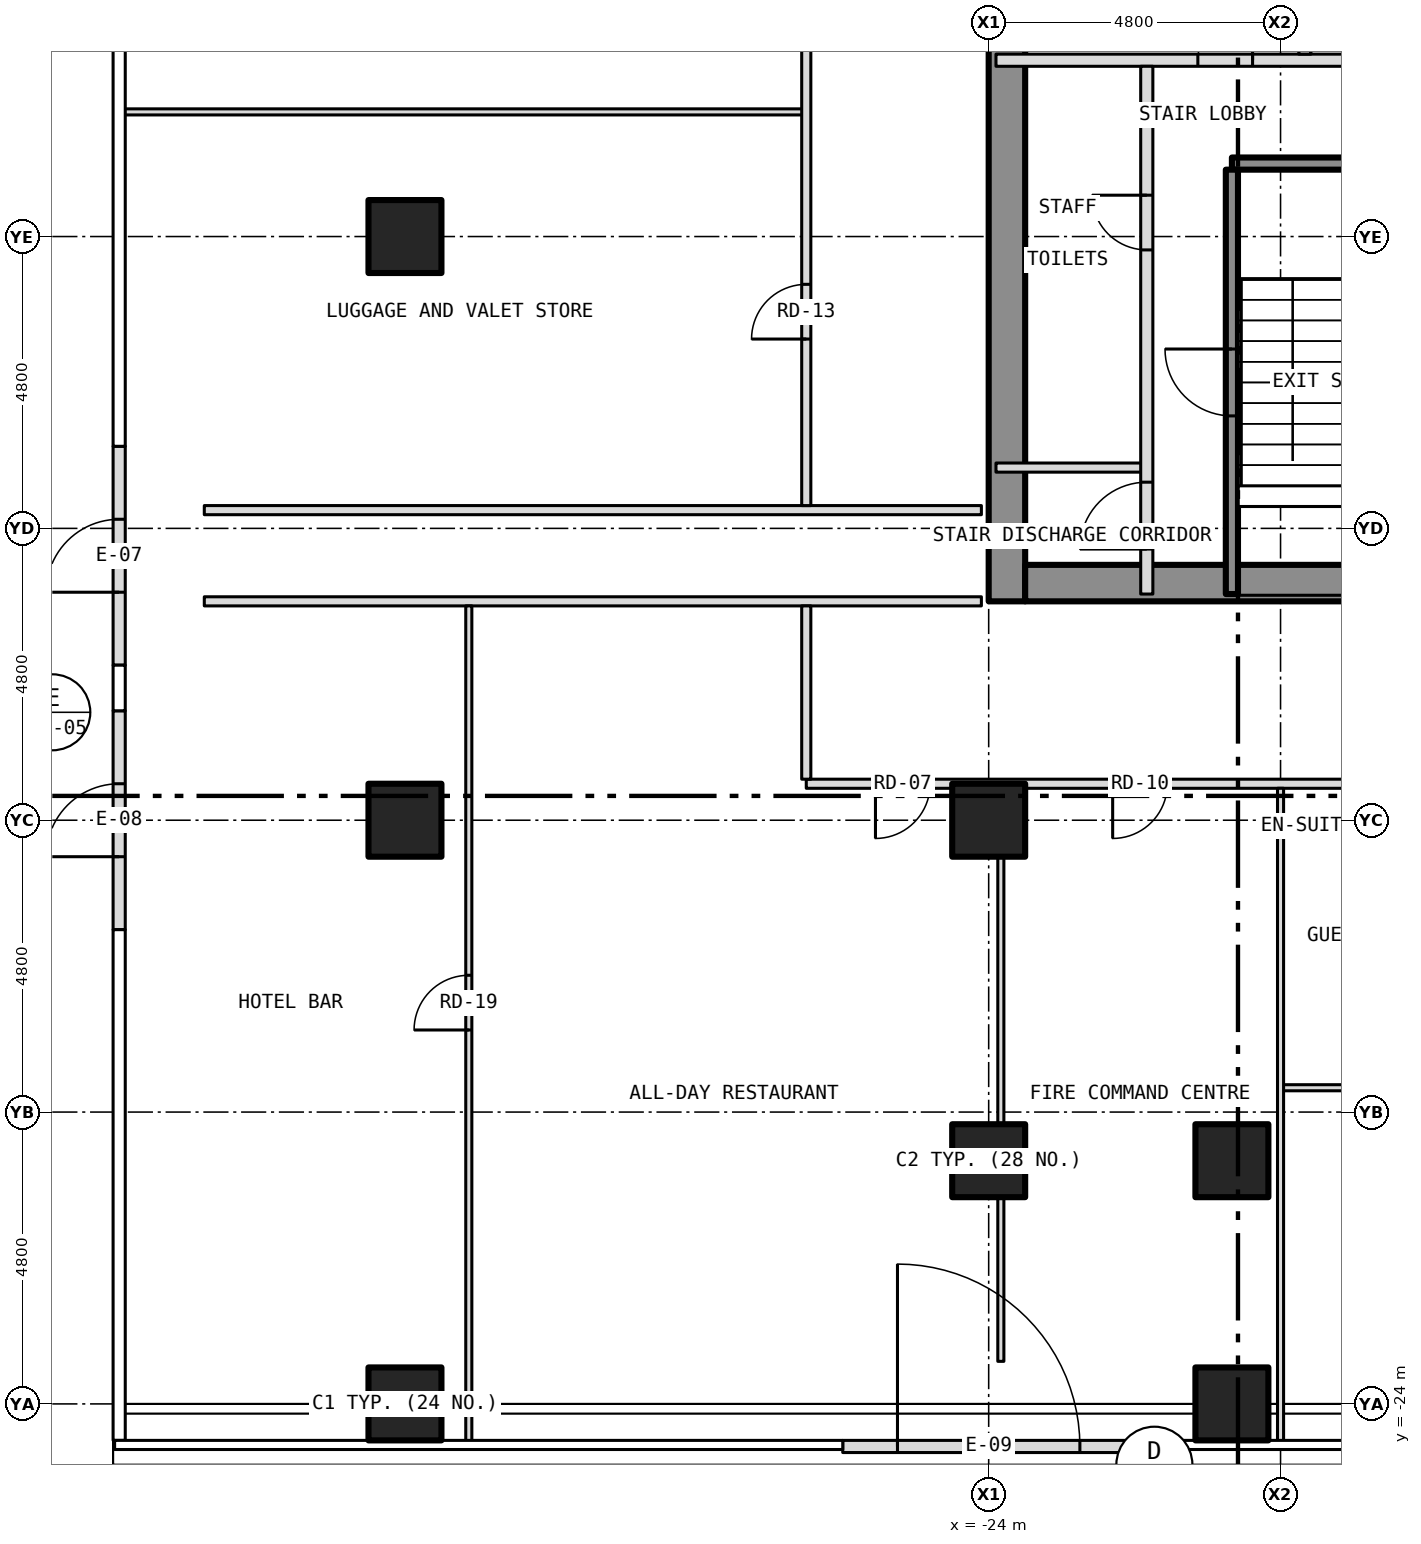
"""IFC4 building model, lengths in metres.
Left out: names, types, materials, properties, quantities, classifications, styles, units other than length and angle.
Written with IfcOpenShell. Run it as: python <this file> out.ifc"""

import sys

from ifc_helpers import new_model, si_unit, direction, frame, frame_2d, origin, origin_2d, place, context, subcontext, project, spatial, rectangle, hollow_rectangle, extrude, element, fill, save


model = new_model("IFC4")
c1 = context("Model", 3, precision=1e-05, world=origin(), true_north=direction((0.0, 1.0)))
c2 = subcontext(c1, "Body", "Model", "MODEL_VIEW")
j1 = project(units=[si_unit("LENGTHUNIT", "METRE"), si_unit("PLANEANGLEUNIT", "RADIAN")], contexts=[c1])
p1 = place(None, origin())
s1 = spatial("IfcSite", under=j1, at=p1, CompositionType="ELEMENT")
p2 = place(p1, origin())
s2 = spatial("IfcBuilding", under=s1, at=p2, CompositionType="ELEMENT")
p3 = place(p2, origin())
s3 = spatial("IfcBuildingStorey", under=s2, at=p3, CompositionType="ELEMENT", Elevation=0.0)
for number, where, z_axis, x_axis in (
    (1, (-33.6, -24.0, -0.3), (0.0, 0.0, 1.0), (1.0, 0.0, 0.0)),
    (2, (-33.6, -14.4, -0.3), (0.0, 0.0, 1.0), (1.0, 0.0, 0.0)),
    (3, (-33.6, -4.8, -0.3), (0.0, 0.0, 1.0), (1.0, 0.0, 0.0)),
    (4, (-20.0, -24.0, -0.3), (0.0, 0.0, 1.0), (1.0, 0.0, 0.0)),
    (5, (-24.0, -20.0, -0.3), (0.0, 0.0, 1.0), (1.0, 0.0, 0.0)),
    (6, (-24.0, -14.4, -0.3), (0.0, 0.0, 1.0), (1.0, 0.0, 0.0)),
    (7, (-20.0, -20.0, -0.3), (0.0, 0.0, 1.0), (1.0, 0.0, 0.0)),
):
    element("IfcColumn", number, at=place(p3, frame(where, z_axis=z_axis, x_axis=x_axis)), inside=s3, PredefinedType="COLUMN", context=c2, shape_type="SweptSolid", body=[
        extrude(hollow_rectangle(XDim=1.2, YDim=1.2, WallThickness=0.07, at=origin_2d()), origin(), (0.0, 0.0, 1.0), 7.55),
    ])
p4 = place(p3, frame((-23.7, -10.8, 0.0), z_axis=(0.0, 0.0, 1.0), x_axis=(0.0, 1.0, 0.0)))
e8 = element("IfcWall", 8, at=p4, inside=s3, PredefinedType="SHEAR", context=c2, shape_type="SweptSolid", body=[
    extrude(rectangle(XDim=21.6, YDim=0.6, at=frame_2d((10.8, 0.0))), origin(), (0.0, 0.0, 1.0), 7.2),
])
p5 = place(p3, frame((-23.4, -10.5, 0.0), z_axis=(0.0, 0.0, 1.0), x_axis=(1.0, 0.0, 0.0)))
e9 = element("IfcWall", 9, at=p5, inside=s3, PredefinedType="SHEAR", context=c2, shape_type="SweptSolid", body=[
    extrude(rectangle(XDim=7.0, YDim=0.6, at=frame_2d((3.5, 0.0))), origin(), (0.0, 0.0, 1.0), 7.2),
])
p6 = place(p3, frame((-38.3, -11.85, 0.0), z_axis=(0.0, 0.0, 1.0), x_axis=(0.0, 1.0, 0.0)))
e10 = element("IfcWall", 10, at=p6, inside=s3, PredefinedType="SOLIDWALL", context=c2, shape_type="SweptSolid", body=[
    extrude(rectangle(XDim=3.6, YDim=0.2, at=frame_2d((1.8, 0.0))), origin(), (0.0, 0.0, 1.0), 6.628),
])
p7 = place(p6, frame((1.2, 0.0, 0.0)))
e11 = element("IfcOpeningElement", 11, at=p7, cuts=e10, PredefinedType="OPENING", context=c2, shape_type="SweptSolid", body=[
    extrude(rectangle(XDim=1.2, YDim=2.4, at=frame_2d((0.6, 1.2))), frame((0.0, 0.112, 0.0), z_axis=(0.0, -1.0, 0.0), x_axis=(1.0, 0.0, 0.0)), (0.0, 0.0, 1.0), 0.224),
])
p8 = place(p3, frame((-38.3, -16.2, 0.0), z_axis=(0.0, 0.0, 1.0), x_axis=(0.0, 1.0, 0.0)))
e12 = element("IfcWall", 12, at=p8, inside=s3, PredefinedType="SOLIDWALL", context=c2, shape_type="SweptSolid", body=[
    extrude(rectangle(XDim=3.6, YDim=0.2, at=frame_2d((1.8, 0.0))), origin(), (0.0, 0.0, 1.0), 6.323),
])
p9 = place(p8, frame((1.2, 0.0, 0.0)))
e13 = element("IfcOpeningElement", 13, at=p9, cuts=e12, PredefinedType="OPENING", context=c2, shape_type="SweptSolid", body=[
    extrude(rectangle(XDim=1.2, YDim=2.4, at=frame_2d((0.6, 1.2))), frame((0.0, 0.112, 0.0), z_axis=(0.0, -1.0, 0.0), x_axis=(1.0, 0.0, 0.0)), (0.0, 0.0, 1.0), 0.224),
])
p10 = place(p3, frame((-26.4, -24.7, -0.2), z_axis=(0.0, 0.0, 1.0), x_axis=(1.0, 0.0, 0.0)))
e14 = element("IfcWall", 14, at=p10, inside=s3, PredefinedType="SOLIDWALL", context=c2, shape_type="SweptSolid", body=[
    extrude(rectangle(XDim=4.8, YDim=0.2, at=frame_2d((2.4, 0.0))), origin(), (0.0, 0.0, 1.0), 7.7),
])
p11 = place(p10, frame((0.9, 0.0, 0.2)))
e15 = element("IfcOpeningElement", 15, at=p11, cuts=e14, PredefinedType="OPENING", context=c2, shape_type="SweptSolid", body=[
    extrude(rectangle(XDim=3.0, YDim=2.6, at=frame_2d((1.5, 1.3))), frame((0.0, 0.112, 0.0), z_axis=(0.0, -1.0, 0.0), x_axis=(1.0, 0.0, 0.0)), (0.0, 0.0, 1.0), 0.224),
])
p12 = place(p3, frame((-19.2, -18.8, 0.0), z_axis=(0.0, 0.0, 1.0), x_axis=(1.0, 0.0, 0.0)))
e16 = element("IfcWall", 16, at=p12, inside=s3, PredefinedType="PARTITIONING", context=c2, shape_type="SweptSolid", body=[
    extrude(rectangle(XDim=5.6, YDim=0.1, at=frame_2d((2.8, 0.0))), origin(), (0.0, 0.0, 1.0), 7.25),
])
p13 = place(p3, frame((-27.0, -13.8, 0.0), z_axis=(0.0, 0.0, 1.0), x_axis=(1.0, 0.0, 0.0)))
e17 = element("IfcWall", 17, at=p13, inside=s3, PredefinedType="PARTITIONING", context=c2, shape_type="SweptSolid", body=[
    extrude(rectangle(XDim=22.2, YDim=0.15, at=frame_2d((11.1, 0.0))), origin(), (0.0, 0.0, 1.0), 7.25),
])
p14 = place(p13, frame((9.03, 0.0, 0.0)))
e18 = element("IfcOpeningElement", 18, at=p14, cuts=e17, PredefinedType="OPENING", context=c2, shape_type="SweptSolid", body=[
    extrude(rectangle(XDim=0.9, YDim=2.1, at=frame_2d((0.45, 1.05))), frame((0.0, 0.087, 0.0), z_axis=(0.0, -1.0, 0.0), x_axis=(1.0, 0.0, 0.0)), (0.0, 0.0, 1.0), 0.174),
])
p15 = place(p13, frame((11.08, 0.0, 0.0)))
e19 = element("IfcOpeningElement", 19, at=p15, cuts=e17, PredefinedType="OPENING", context=c2, shape_type="SweptSolid", body=[
    extrude(rectangle(XDim=0.9, YDim=2.1, at=frame_2d((0.45, 1.05))), frame((0.0, 0.087, 0.0), z_axis=(0.0, -1.0, 0.0), x_axis=(1.0, 0.0, 0.0)), (0.0, 0.0, 1.0), 0.174),
])
p16 = place(p13, frame((1.138, 0.0, 0.0)))
e20 = element("IfcOpeningElement", 20, at=p16, cuts=e17, PredefinedType="OPENING", context=c2, shape_type="SweptSolid", body=[
    extrude(rectangle(XDim=0.9, YDim=2.1, at=frame_2d((0.45, 1.05))), frame((0.0, 0.087, 0.0), z_axis=(0.0, -1.0, 0.0), x_axis=(1.0, 0.0, 0.0)), (0.0, 0.0, 1.0), 0.174),
])
p17 = place(p13, frame((5.039, 0.0, 0.0)))
e21 = element("IfcOpeningElement", 21, at=p17, cuts=e17, PredefinedType="OPENING", context=c2, shape_type="SweptSolid", body=[
    extrude(rectangle(XDim=0.9, YDim=2.1, at=frame_2d((0.45, 1.05))), frame((0.0, 0.087, 0.0), z_axis=(0.0, -1.0, 0.0), x_axis=(1.0, 0.0, 0.0)), (0.0, 0.0, 1.0), 0.174),
])
for number, where, z_axis, x_axis in (
    (22, (-36.9, -10.8, 0.0), (0.0, 0.0, 1.0), (1.0, 0.0, 0.0)),
    (23, (-36.9, -9.3, 0.0), (0.0, 0.0, 1.0), (1.0, 0.0, 0.0)),
):
    element("IfcWall", number, at=place(p3, frame(where, z_axis=z_axis, x_axis=x_axis)), inside=s3, PredefinedType="PARTITIONING", context=c2, shape_type="SweptSolid", body=[
        extrude(rectangle(XDim=12.78, YDim=0.15, at=frame_2d((6.39, 0.0))), origin(), (0.0, 0.0, 1.0), 7.25),
    ])
p18 = place(p3, frame((-23.88, -8.6, 0.0), z_axis=(0.0, 0.0, 1.0), x_axis=(1.0, 0.0, 0.0)))
e24 = element("IfcWall", 24, at=p18, inside=s3, PredefinedType="PARTITIONING", context=c2, shape_type="SweptSolid", body=[
    extrude(rectangle(XDim=2.48, YDim=0.15, at=frame_2d((1.24, 0.0))), origin(), (0.0, 0.0, 1.0), 7.2),
])
p19 = place(p3, frame((-20.0, -3.6, 0.0), z_axis=(0.0, 0.0, 1.0), x_axis=(1.0, 0.0, 0.0)))
e25 = element("IfcWall", 25, at=p19, inside=s3, PredefinedType="SHEAR", context=c2, shape_type="SweptSolid", body=[
    extrude(rectangle(XDim=4.08, YDim=0.2, at=frame_2d((2.04, 0.0))), origin(), (0.0, 0.0, 1.0), 7.2),
])
p20 = place(p3, frame((-38.28, -2.75, 0.0), z_axis=(0.0, 0.0, 1.0), x_axis=(1.0, 0.0, 0.0)))
e26 = element("IfcWall", 26, at=p20, inside=s3, PredefinedType="PARTITIONING", context=c2, shape_type="SweptSolid", body=[
    extrude(rectangle(XDim=11.28, YDim=0.1, at=frame_2d((5.64, 0.0))), origin(), (0.0, 0.0, 1.0), 7.25),
])
p21 = place(p3, frame((-23.88, -1.9, 0.0), z_axis=(0.0, 0.0, 1.0), x_axis=(1.0, 0.0, 0.0)))
e27 = element("IfcWall", 27, at=p21, inside=s3, PredefinedType="PARTITIONING", context=c2, shape_type="SweptSolid", body=[
    extrude(rectangle(XDim=7.96, YDim=0.2, at=frame_2d((3.98, 0.0))), origin(), (0.0, 0.0, 1.0), 7.2),
])
p22 = place(p21, frame((3.32, 0.0, 0.0)))
e28 = element("IfcOpeningElement", 28, at=p22, cuts=e27, PredefinedType="OPENING", context=c2, shape_type="SweptSolid", body=[
    extrude(rectangle(XDim=0.9, YDim=2.1, at=frame_2d((0.45, 1.05))), frame((0.0, 0.112, 0.0), z_axis=(0.0, -1.0, 0.0), x_axis=(1.0, 0.0, 0.0)), (0.0, 0.0, 1.0), 0.224),
])
p23 = place(p3, frame((-32.55, -24.63, 0.0), z_axis=(0.0, 0.0, 1.0), x_axis=(0.0, 1.0, 0.0)))
e29 = element("IfcWall", 29, at=p23, inside=s3, PredefinedType="PARTITIONING", context=c2, shape_type="SweptSolid", body=[
    extrude(rectangle(XDim=13.755, YDim=0.1, at=frame_2d((6.877, 0.0))), origin(), (0.0, 0.0, 1.0), 7.25),
])
p24 = place(p23, frame((6.78, 0.0, 0.0)))
e30 = element("IfcOpeningElement", 30, at=p24, cuts=e29, PredefinedType="OPENING", context=c2, shape_type="SweptSolid", body=[
    extrude(rectangle(XDim=0.9, YDim=2.1, at=frame_2d((0.45, 1.05))), frame((0.0, 0.062, 0.0), z_axis=(0.0, -1.0, 0.0), x_axis=(1.0, 0.0, 0.0)), (0.0, 0.0, 1.0), 0.124),
])
p25 = place(p3, frame((-27.0, -13.725, 0.0), z_axis=(0.0, 0.0, 1.0), x_axis=(0.0, 1.0, 0.0)))
e31 = element("IfcWall", 31, at=p25, inside=s3, PredefinedType="PARTITIONING", context=c2, shape_type="SweptSolid", body=[
    extrude(rectangle(XDim=2.85, YDim=0.15, at=frame_2d((1.425, 0.0))), origin(), (0.0, 0.0, 1.0), 7.25),
])
p26 = place(p3, frame((-27.0, -9.225, 0.0), z_axis=(0.0, 0.0, 1.0), x_axis=(0.0, 1.0, 0.0)))
e32 = element("IfcWall", 32, at=p26, inside=s3, PredefinedType="PARTITIONING", context=c2, shape_type="SweptSolid", body=[
    extrude(rectangle(XDim=22.95, YDim=0.15, at=frame_2d((11.475, 0.0))), origin(), (0.0, 0.0, 1.0), 7.25),
])
p27 = place(p26, frame((2.739, 0.0, 0.0)))
e33 = element("IfcOpeningElement", 33, at=p27, cuts=e32, PredefinedType="OPENING", context=c2, shape_type="SweptSolid", body=[
    extrude(rectangle(XDim=0.9, YDim=2.1, at=frame_2d((0.45, 1.05))), frame((0.0, 0.087, 0.0), z_axis=(0.0, -1.0, 0.0), x_axis=(1.0, 0.0, 0.0)), (0.0, 0.0, 1.0), 0.174),
])
p28 = place(p26, frame((12.696, 0.0, 0.0)))
e34 = element("IfcOpeningElement", 34, at=p28, cuts=e32, PredefinedType="OPENING", context=c2, shape_type="SweptSolid", body=[
    extrude(rectangle(XDim=0.9, YDim=2.1, at=frame_2d((0.45, 1.05))), frame((0.0, 0.087, 0.0), z_axis=(0.0, -1.0, 0.0), x_axis=(1.0, 0.0, 0.0)), (0.0, 0.0, 1.0), 0.174),
])
p29 = place(p3, frame((-23.8, -23.3, 0.0), z_axis=(0.0, 0.0, 1.0), x_axis=(0.0, 1.0, 0.0)))
e35 = element("IfcWall", 35, at=p29, inside=s3, PredefinedType="PARTITIONING", context=c2, shape_type="SweptSolid", body=[
    extrude(rectangle(XDim=2.7, YDim=0.1, at=frame_2d((1.35, 0.0))), origin(), (0.0, 0.0, 1.0), 6.323),
])
p30 = place(p3, frame((-23.8, -20.6, 0.0), z_axis=(0.0, 0.0, 1.0), x_axis=(0.0, 1.0, 0.0)))
e36 = element("IfcWall", 36, at=p30, inside=s3, PredefinedType="PARTITIONING", context=c2, shape_type="SweptSolid", body=[
    extrude(rectangle(XDim=1.2, YDim=0.1, at=frame_2d((0.6, 0.0))), origin(), (0.0, 0.0, 1.0), 7.25),
])
p31 = place(p3, frame((-23.8, -19.4, 0.0), z_axis=(0.0, 0.0, 1.0), x_axis=(0.0, 1.0, 0.0)))
e37 = element("IfcWall", 37, at=p31, inside=s3, PredefinedType="PARTITIONING", context=c2, shape_type="SweptSolid", body=[
    extrude(rectangle(XDim=4.4, YDim=0.1, at=frame_2d((2.2, 0.0))), origin(), (0.0, 0.0, 1.0), 6.323),
])
p32 = place(p3, frame((-23.8, -15.0, 0.0), z_axis=(0.0, 0.0, 1.0), x_axis=(0.0, 1.0, 0.0)))
e38 = element("IfcWall", 38, at=p32, inside=s3, PredefinedType="PARTITIONING", context=c2, shape_type="SweptSolid", body=[
    extrude(rectangle(XDim=1.125, YDim=0.1, at=frame_2d((0.562, 0.0))), origin(), (0.0, 0.0, 1.0), 7.25),
])
p33 = place(p3, frame((-21.4, -10.68, 0.0), z_axis=(0.0, 0.0, 1.0), x_axis=(0.0, 1.0, 0.0)))
e39 = element("IfcWall", 39, at=p33, inside=s3, PredefinedType="PARTITIONING", context=c2, shape_type="SweptSolid", body=[
    extrude(rectangle(XDim=8.68, YDim=0.2, at=frame_2d((4.34, 0.0))), origin(), (0.0, 0.0, 1.0), 7.2),
])
p34 = place(p33, frame((5.66, 0.0, 0.0)))
e40 = element("IfcOpeningElement", 40, at=p34, cuts=e39, PredefinedType="OPENING", context=c2, shape_type="SweptSolid", body=[
    extrude(rectangle(XDim=0.9, YDim=2.1, at=frame_2d((0.45, 1.05))), frame((0.0, 0.112, 0.0), z_axis=(0.0, -1.0, 0.0), x_axis=(1.0, 0.0, 0.0)), (0.0, 0.0, 1.0), 0.224),
])
p35 = place(p33, frame((0.74, 0.0, 0.0)))
e41 = element("IfcOpeningElement", 41, at=p35, cuts=e39, PredefinedType="OPENING", context=c2, shape_type="SweptSolid", body=[
    extrude(rectangle(XDim=1.1, YDim=2.1, at=frame_2d((0.55, 1.05))), frame((0.0, 0.112, 0.0), z_axis=(0.0, -1.0, 0.0), x_axis=(1.0, 0.0, 0.0)), (0.0, 0.0, 1.0), 0.224),
])
p36 = place(p3, frame((-20.0, -10.68, 0.0), z_axis=(0.0, 0.0, 1.0), x_axis=(0.0, 1.0, 0.0)))
e42 = element("IfcWall", 42, at=p36, inside=s3, PredefinedType="SHEAR", context=c2, shape_type="SweptSolid", body=[
    extrude(rectangle(XDim=6.98, YDim=0.2, at=frame_2d((3.49, 0.0))), origin(), (0.0, 0.0, 1.0), 7.2),
])
p37 = place(p36, frame((2.93, 0.0, 0.0)))
e43 = element("IfcOpeningElement", 43, at=p37, cuts=e42, PredefinedType="OPENING", context=c2, shape_type="SweptSolid", body=[
    extrude(rectangle(XDim=1.1, YDim=2.1, at=frame_2d((0.55, 1.05))), frame((0.0, 0.112, 0.0), z_axis=(0.0, -1.0, 0.0), x_axis=(1.0, 0.0, 0.0)), (0.0, 0.0, 1.0), 0.224),
])
p38 = place(p3, frame((-19.2, -24.63, 0.0), z_axis=(0.0, 0.0, 1.0), x_axis=(0.0, 1.0, 0.0)))
e44 = element("IfcWall", 44, at=p38, inside=s3, PredefinedType="PARTITIONING", context=c2, shape_type="SweptSolid", body=[
    extrude(rectangle(XDim=10.076, YDim=0.1, at=frame_2d((5.038, 0.0))), origin(), (0.0, 0.0, 1.0), 6.633),
])
p39 = place(p3, frame((-19.2, -14.554, 0.0), z_axis=(0.0, 0.0, 1.0), x_axis=(0.0, 1.0, 0.0)))
e45 = element("IfcWall", 45, at=p39, inside=s3, PredefinedType="PARTITIONING", context=c2, shape_type="SweptSolid", body=[
    extrude(rectangle(XDim=0.679, YDim=0.1, at=frame_2d((0.339, 0.0))), origin(), (0.0, 0.0, 1.0), 7.25),
])
p40 = place(p3, frame((-18.8, -1.8, 0.0), z_axis=(0.0, 0.0, 1.0), x_axis=(0.0, 1.0, 0.0)))
e46 = element("IfcWall", 46, at=p40, inside=s3, PredefinedType="PARTITIONING", context=c2, shape_type="SweptSolid", body=[
    extrude(rectangle(XDim=12.48, YDim=0.2, at=frame_2d((6.24, 0.0))), origin(), (0.0, 0.0, 1.0), 7.2),
])
p41 = place(p7, origin())
e47 = element("IfcDoor", 47, at=p41, inside=s3, OperationType="SINGLE_SWING_LEFT", PredefinedType="DOOR", context=c2, shape_type="SweptSolid", body=[
    extrude(rectangle(XDim=1.2, YDim=2.4, at=frame_2d((0.6, 1.2))), frame((0.0, 0.025, 0.0), z_axis=(0.0, -1.0, 0.0), x_axis=(1.0, 0.0, 0.0)), (0.0, 0.0, 1.0), 0.05),
])
fill(e11, e47)
p42 = place(p9, origin())
e48 = element("IfcDoor", 48, at=p42, inside=s3, OperationType="SINGLE_SWING_LEFT", PredefinedType="DOOR", context=c2, shape_type="SweptSolid", body=[
    extrude(rectangle(XDim=1.2, YDim=2.4, at=frame_2d((0.6, 1.2))), frame((0.0, 0.025, 0.0), z_axis=(0.0, -1.0, 0.0), x_axis=(1.0, 0.0, 0.0)), (0.0, 0.0, 1.0), 0.05),
])
fill(e13, e48)
p43 = place(p11, origin())
e49 = element("IfcDoor", 49, at=p43, inside=s3, OperationType="REVOLVING", PredefinedType="DOOR", context=c2, shape_type="SweptSolid", body=[
    extrude(rectangle(XDim=3.0, YDim=2.6, at=frame_2d((1.5, 1.3))), frame((0.0, 0.025, 0.0), z_axis=(0.0, -1.0, 0.0), x_axis=(1.0, 0.0, 0.0)), (0.0, 0.0, 1.0), 0.05),
])
fill(e15, e49)
p44 = place(p34, origin())
e50 = element("IfcDoor", 50, at=p44, inside=s3, OperationType="SINGLE_SWING_RIGHT", PredefinedType="DOOR", context=c2, shape_type="SweptSolid", body=[
    extrude(rectangle(XDim=0.9, YDim=2.1, at=frame_2d((0.45, 1.05))), frame((0.0, 0.025, 0.0), z_axis=(0.0, -1.0, 0.0), x_axis=(1.0, 0.0, 0.0)), (0.0, 0.0, 1.0), 0.05),
])
fill(e40, e50)
p45 = place(p22, origin())
e51 = element("IfcDoor", 51, at=p45, inside=s3, OperationType="SINGLE_SWING_RIGHT", PredefinedType="DOOR", context=c2, shape_type="SweptSolid", body=[
    extrude(rectangle(XDim=0.9, YDim=2.1, at=frame_2d((0.45, 1.05))), frame((0.0, 0.025, 0.0), z_axis=(0.0, -1.0, 0.0), x_axis=(1.0, 0.0, 0.0)), (0.0, 0.0, 1.0), 0.05),
])
fill(e28, e51)
p46 = place(p35, origin())
e52 = element("IfcDoor", 52, at=p46, inside=s3, OperationType="SINGLE_SWING_LEFT", PredefinedType="DOOR", context=c2, shape_type="SweptSolid", body=[
    extrude(rectangle(XDim=1.1, YDim=2.1, at=frame_2d((0.55, 1.05))), frame((0.0, 0.025, 0.0), z_axis=(0.0, -1.0, 0.0), x_axis=(1.0, 0.0, 0.0)), (0.0, 0.0, 1.0), 0.05),
])
fill(e41, e52)
p47 = place(p37, origin())
e53 = element("IfcDoor", 53, at=p47, inside=s3, OperationType="SINGLE_SWING_RIGHT", PredefinedType="DOOR", context=c2, shape_type="SweptSolid", body=[
    extrude(rectangle(XDim=1.1, YDim=2.1, at=frame_2d((0.55, 1.05))), frame((0.0, 0.025, 0.0), z_axis=(0.0, -1.0, 0.0), x_axis=(1.0, 0.0, 0.0)), (0.0, 0.0, 1.0), 0.05),
])
fill(e43, e53)
p48 = place(p16, origin())
e54 = element("IfcDoor", 54, at=p48, inside=s3, OperationType="SINGLE_SWING_LEFT", PredefinedType="DOOR", context=c2, shape_type="SweptSolid", body=[
    extrude(rectangle(XDim=0.9, YDim=2.1, at=frame_2d((0.45, 1.05))), frame((0.0, 0.025, 0.0), z_axis=(0.0, -1.0, 0.0), x_axis=(1.0, 0.0, 0.0)), (0.0, 0.0, 1.0), 0.05),
])
fill(e20, e54)
p49 = place(p17, origin())
e55 = element("IfcDoor", 55, at=p49, inside=s3, OperationType="SINGLE_SWING_LEFT", PredefinedType="DOOR", context=c2, shape_type="SweptSolid", body=[
    extrude(rectangle(XDim=0.9, YDim=2.1, at=frame_2d((0.45, 1.05))), frame((0.0, 0.025, 0.0), z_axis=(0.0, -1.0, 0.0), x_axis=(1.0, 0.0, 0.0)), (0.0, 0.0, 1.0), 0.05),
])
fill(e21, e55)
p50 = place(p27, origin())
e56 = element("IfcDoor", 56, at=p50, inside=s3, OperationType="SINGLE_SWING_LEFT", PredefinedType="DOOR", context=c2, shape_type="SweptSolid", body=[
    extrude(rectangle(XDim=0.9, YDim=2.1, at=frame_2d((0.45, 1.05))), frame((0.0, 0.025, 0.0), z_axis=(0.0, -1.0, 0.0), x_axis=(1.0, 0.0, 0.0)), (0.0, 0.0, 1.0), 0.05),
])
fill(e33, e56)
p51 = place(p24, origin())
e57 = element("IfcDoor", 57, at=p51, inside=s3, OperationType="SINGLE_SWING_LEFT", PredefinedType="DOOR", context=c2, shape_type="SweptSolid", body=[
    extrude(rectangle(XDim=0.9, YDim=2.1, at=frame_2d((0.45, 1.05))), frame((0.0, 0.025, 0.0), z_axis=(0.0, -1.0, 0.0), x_axis=(1.0, 0.0, 0.0)), (0.0, 0.0, 1.0), 0.05),
])
fill(e30, e57)
save(model, sys.argv[1])
